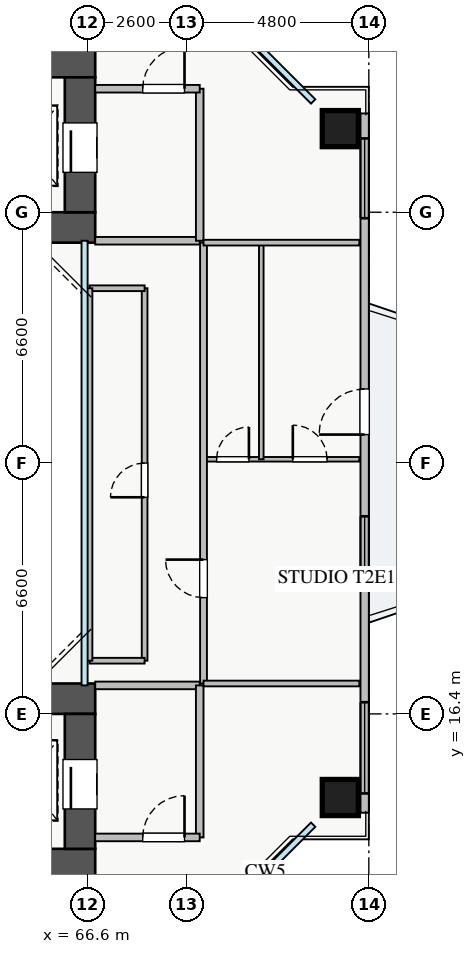
"""IFC4 building model, lengths in metres.
Left out: names, types, materials, properties, quantities, classifications, styles, units other than length and angle.
Written with IfcOpenShell. Run it as: python <this file> out.ifc"""

import sys

from ifc_helpers import new_model, si_unit, direction, frame, frame_2d, origin, origin_2d, place, context, subcontext, project, spatial, rectangle, extrude, source, transform, mapped, element, fill, save


model = new_model("IFC4")
c1 = context("Model", 3, precision=1e-05, world=origin(), true_north=direction((0.0, 1.0)))
c2 = subcontext(c1, "Body", "Model", "MODEL_VIEW")
j1 = project(units=[si_unit("LENGTHUNIT", "METRE"), si_unit("PLANEANGLEUNIT", "RADIAN")], contexts=[c1])
p1 = place(None, origin())
s1 = spatial("IfcSite", under=j1, at=p1, CompositionType="ELEMENT")
p2 = place(p1, origin())
s2 = spatial("IfcBuilding", under=s1, at=p2, CompositionType="ELEMENT")
p3 = place(p2, frame((0.0, 0.0, 32.75)))
s3 = spatial("IfcBuildingStorey", under=s2, at=p3, CompositionType="ELEMENT", Elevation=32.75)
p4 = place(p3, frame((54.2, 29.2, 0.0), z_axis=(0.0, 0.0, 1.0), x_axis=(1.0, 0.0, 0.0)))
e1 = element("IfcWall", 1, at=p4, inside=s3, PredefinedType="SHEAR", context=c2, shape_type="SweptSolid", body=[
    extrude(rectangle(XDim=12.6, YDim=0.8, at=frame_2d((6.3, 0.0))), origin(), (0.0, 0.0, 1.0), 3.25),
])
p5 = place(p3, frame((54.2, 33.55, 0.0), z_axis=(0.0, 0.0, 1.0), x_axis=(1.0, 0.0, 0.0)))
e2 = element("IfcWall", 2, at=p5, inside=s3, PredefinedType="SHEAR", context=c2, shape_type="SweptSolid", body=[
    extrude(rectangle(XDim=12.6, YDim=0.8, at=frame_2d((6.3, 0.0))), origin(), (0.0, 0.0, 1.0), 3.25),
])
p6 = place(p5, frame((8.2, 0.0, 0.0)))
e3 = element("IfcOpeningElement", 3, at=p6, cuts=e2, PredefinedType="OPENING", context=c2, shape_type="SweptSolid", body=[
    extrude(rectangle(XDim=1.1, YDim=2.05, at=frame_2d((0.55, 1.025))), frame((0.0, 0.41, 0.0), z_axis=(0.0, -1.0, 0.0), x_axis=(1.0, 0.0, 0.0)), (0.0, 0.0, 1.0), 0.82),
])
p7 = place(p3, frame((66.4, 29.6, 0.0), z_axis=(0.0, 0.0, 1.0), x_axis=(0.0, 1.0, 0.0)))
e4 = element("IfcWall", 4, at=p7, inside=s3, PredefinedType="SHEAR", context=c2, shape_type="SweptSolid", body=[
    extrude(rectangle(XDim=3.55, YDim=0.8, at=frame_2d((1.775, 0.0))), origin(), (0.0, 0.0, 1.0), 3.25),
])
p8 = place(p7, frame((1.05, 0.0, 0.0)))
e5 = element("IfcOpeningElement", 5, at=p8, cuts=e4, PredefinedType="OPENING", context=c2, shape_type="SweptSolid", body=[
    extrude(rectangle(XDim=1.3, YDim=2.05, at=frame_2d((0.65, 1.025))), frame((0.0, 0.41, 0.0), z_axis=(0.0, -1.0, 0.0), x_axis=(1.0, 0.0, 0.0)), (0.0, 0.0, 1.0), 0.82),
])
p9 = place(p3, frame((54.2, 12.45, 0.0), z_axis=(0.0, 0.0, 1.0), x_axis=(1.0, 0.0, 0.0)))
e6 = element("IfcWall", 6, at=p9, inside=s3, PredefinedType="SHEAR", context=c2, shape_type="SweptSolid", body=[
    extrude(rectangle(XDim=12.6, YDim=0.8, at=frame_2d((6.3, 0.0))), origin(), (0.0, 0.0, 1.0), 3.25),
])
p10 = place(p9, frame((8.2, 0.0, 0.0)))
e7 = element("IfcOpeningElement", 7, at=p10, cuts=e6, PredefinedType="OPENING", context=c2, shape_type="SweptSolid", body=[
    extrude(rectangle(XDim=1.1, YDim=2.05, at=frame_2d((0.55, 1.025))), frame((0.0, 0.41, 0.0), z_axis=(0.0, -1.0, 0.0), x_axis=(1.0, 0.0, 0.0)), (0.0, 0.0, 1.0), 0.82),
])
p11 = place(p3, frame((54.2, 16.8, 0.0), z_axis=(0.0, 0.0, 1.0), x_axis=(1.0, 0.0, 0.0)))
e8 = element("IfcWall", 8, at=p11, inside=s3, PredefinedType="SHEAR", context=c2, shape_type="SweptSolid", body=[
    extrude(rectangle(XDim=12.6, YDim=0.8, at=frame_2d((6.3, 0.0))), origin(), (0.0, 0.0, 1.0), 3.25),
])
p12 = place(p3, frame((66.4, 12.85, 0.0), z_axis=(0.0, 0.0, 1.0), x_axis=(0.0, 1.0, 0.0)))
e9 = element("IfcWall", 9, at=p12, inside=s3, PredefinedType="SHEAR", context=c2, shape_type="SweptSolid", body=[
    extrude(rectangle(XDim=3.55, YDim=0.8, at=frame_2d((1.775, 0.0))), origin(), (0.0, 0.0, 1.0), 3.25),
])
p13 = place(p12, frame((1.05, 0.0, 0.0)))
e10 = element("IfcOpeningElement", 10, at=p13, cuts=e9, PredefinedType="OPENING", context=c2, shape_type="SweptSolid", body=[
    extrude(rectangle(XDim=1.3, YDim=2.05, at=frame_2d((0.65, 1.025))), frame((0.0, 0.41, 0.0), z_axis=(0.0, -1.0, 0.0), x_axis=(1.0, 0.0, 0.0)), (0.0, 0.0, 1.0), 0.82),
])
m1 = source(origin(), c2, "Body", "SweptSolid", [
    extrude(rectangle(XDim=0.95, YDim=0.95, at=origin_2d()), origin(), (0.0, 0.0, 1.0), 3.25),
])
for number, where, z_axis, x_axis in (
    (11, (73.25, 14.2, 0.0), (0.0, 0.0, 1.0), (1.0, 0.0, 0.0)),
    (12, (73.25, 31.8, 0.0), (0.0, 0.0, 1.0), (1.0, 0.0, 0.0)),
):
    element("IfcColumn", number, at=place(p3, frame(where, z_axis=z_axis, x_axis=x_axis)), inside=s3, PredefinedType="COLUMN", context=c2, shape_type="MappedRepresentation", body=[
        mapped(m1, transform((0.0, 0.0, 0.0), x_axis=(1.0, 0.0, 0.0), y_axis=(0.0, 1.0, 0.0), z_axis=(0.0, 0.0, 1.0), scale=1.0)),
    ])
p14 = place(p3, frame((73.89, 13.8, 0.0), z_axis=(0.0, 0.0, 1.0), x_axis=(0.0, 1.0, 0.0)))
e13 = element("IfcWall", 13, at=p14, inside=s3, PredefinedType="STANDARD", context=c2, shape_type="SweptSolid", body=[
    extrude(rectangle(XDim=18.4, YDim=0.22, at=frame_2d((9.2, 0.0))), origin(), (0.0, 0.0, 1.0), 2.61),
])
p15 = place(p14, frame((9.95, 0.0, 0.0)))
e14 = element("IfcOpeningElement", 14, at=p15, cuts=e13, PredefinedType="OPENING", context=c2, shape_type="SweptSolid", body=[
    extrude(rectangle(XDim=1.2, YDim=2.1, at=frame_2d((0.6, 1.05))), frame((0.0, 0.12, 0.0), z_axis=(0.0, -1.0, 0.0), x_axis=(1.0, 0.0, 0.0)), (0.0, 0.0, 1.0), 0.24),
])
p16 = place(p14, frame((0.508, 0.0, 0.9)))
e15 = element("IfcOpeningElement", 15, at=p16, cuts=e13, PredefinedType="OPENING", context=c2, shape_type="SweptSolid", body=[
    extrude(rectangle(XDim=2.4, YDim=1.5, at=frame_2d((1.2, 0.75))), frame((0.0, 0.12, 0.0), z_axis=(0.0, -1.0, 0.0), x_axis=(1.0, 0.0, 0.0)), (0.0, 0.0, 1.0), 0.24),
])
p17 = place(p14, frame((6.0, 0.0, 0.9)))
e16 = element("IfcOpeningElement", 16, at=p17, cuts=e13, PredefinedType="OPENING", context=c2, shape_type="SweptSolid", body=[
    extrude(rectangle(XDim=1.8, YDim=1.45, at=frame_2d((0.9, 0.725))), frame((0.0, 0.12, 0.0), z_axis=(0.0, -1.0, 0.0), x_axis=(1.0, 0.0, 0.0)), (0.0, 0.0, 1.0), 0.24),
])
p18 = place(p14, frame((15.643, 0.0, 0.9)))
e17 = element("IfcOpeningElement", 17, at=p18, cuts=e13, PredefinedType="OPENING", context=c2, shape_type="SweptSolid", body=[
    extrude(rectangle(XDim=2.1, YDim=1.5, at=frame_2d((1.05, 0.75))), frame((0.0, 0.12, 0.0), z_axis=(0.0, -1.0, 0.0), x_axis=(1.0, 0.0, 0.0)), (0.0, 0.0, 1.0), 0.24),
])
p19 = place(p3, frame((66.8, 28.85, 0.0), z_axis=(0.0, 0.0, 1.0), x_axis=(1.0, 0.0, 0.0)))
e18 = element("IfcWall", 18, at=p19, inside=s3, PredefinedType="PARTITIONING", context=c2, shape_type="SweptSolid", body=[
    extrude(rectangle(XDim=2.75, YDim=0.2, at=frame_2d((1.375, 0.0))), origin(), (0.0, 0.0, 1.0), 3.07),
])
p20 = place(p3, frame((69.55, 28.85, 0.0), z_axis=(0.0, 0.0, 1.0), x_axis=(0.0, 1.0, 0.0)))
e19 = element("IfcWall", 19, at=p20, inside=s3, PredefinedType="PARTITIONING", context=c2, shape_type="SweptSolid", body=[
    extrude(rectangle(XDim=4.0, YDim=0.2, at=frame_2d((2.0, 0.0))), origin(), (0.0, 0.0, 1.0), 2.615),
])
p21 = place(p3, frame((66.8, 32.85, 0.0), z_axis=(0.0, 0.0, 1.0), x_axis=(1.0, 0.0, 0.0)))
e20 = element("IfcWall", 20, at=p21, inside=s3, PredefinedType="PARTITIONING", context=c2, shape_type="SweptSolid", body=[
    extrude(rectangle(XDim=2.75, YDim=0.2, at=frame_2d((1.375, 0.0))), origin(), (0.0, 0.0, 1.0), 3.07),
])
p22 = place(p21, frame((1.25, 0.0, 0.0)))
e21 = element("IfcOpeningElement", 21, at=p22, cuts=e20, PredefinedType="OPENING", context=c2, shape_type="SweptSolid", body=[
    extrude(rectangle(XDim=1.1, YDim=2.05, at=frame_2d((0.55, 1.025))), frame((0.0, 0.11, 0.0), z_axis=(0.0, -1.0, 0.0), x_axis=(1.0, 0.0, 0.0)), (0.0, 0.0, 1.0), 0.22),
])
p23 = place(p3, frame((66.8, 17.15, 0.0), z_axis=(0.0, 0.0, 1.0), x_axis=(1.0, 0.0, 0.0)))
e22 = element("IfcWall", 22, at=p23, inside=s3, PredefinedType="PARTITIONING", context=c2, shape_type="SweptSolid", body=[
    extrude(rectangle(XDim=2.75, YDim=0.2, at=frame_2d((1.375, 0.0))), origin(), (0.0, 0.0, 1.0), 3.07),
])
p24 = place(p3, frame((69.55, 13.15, 0.0), z_axis=(0.0, 0.0, 1.0), x_axis=(0.0, 1.0, 0.0)))
e23 = element("IfcWall", 23, at=p24, inside=s3, PredefinedType="PARTITIONING", context=c2, shape_type="SweptSolid", body=[
    extrude(rectangle(XDim=4.0, YDim=0.2, at=frame_2d((2.0, 0.0))), origin(), (0.0, 0.0, 1.0), 2.615),
])
p25 = place(p3, frame((66.8, 13.15, 0.0), z_axis=(0.0, 0.0, 1.0), x_axis=(1.0, 0.0, 0.0)))
e24 = element("IfcWall", 24, at=p25, inside=s3, PredefinedType="PARTITIONING", context=c2, shape_type="SweptSolid", body=[
    extrude(rectangle(XDim=2.75, YDim=0.2, at=frame_2d((1.375, 0.0))), origin(), (0.0, 0.0, 1.0), 3.07),
])
p26 = place(p25, frame((1.25, 0.0, 0.0)))
e25 = element("IfcOpeningElement", 25, at=p26, cuts=e24, PredefinedType="OPENING", context=c2, shape_type="SweptSolid", body=[
    extrude(rectangle(XDim=1.1, YDim=2.05, at=frame_2d((0.55, 1.025))), frame((0.0, 0.11, 0.0), z_axis=(0.0, -1.0, 0.0), x_axis=(1.0, 0.0, 0.0)), (0.0, 0.0, 1.0), 0.22),
])
p27 = place(p3, frame((69.65, 23.1, 0.0), z_axis=(0.0, 0.0, 1.0), x_axis=(1.0, 0.0, 0.0)))
e26 = element("IfcWall", 26, at=p27, inside=s3, PredefinedType="PLUMBINGWALL", context=c2, shape_type="SweptSolid", body=[
    extrude(rectangle(XDim=4.1, YDim=0.12, at=frame_2d((2.05, 0.0))), origin(), (0.0, 0.0, 1.0), 2.865),
])
p28 = place(p27, frame((0.345, 0.0, 0.0)))
e27 = element("IfcOpeningElement", 27, at=p28, cuts=e26, PredefinedType="OPENING", context=c2, shape_type="SweptSolid", body=[
    extrude(rectangle(XDim=0.85, YDim=2.05, at=frame_2d((0.425, 1.025))), frame((0.0, 0.07, 0.0), z_axis=(0.0, -1.0, 0.0), x_axis=(1.0, 0.0, 0.0)), (0.0, 0.0, 1.0), 0.14),
])
p29 = place(p27, frame((2.35, 0.0, 0.0)))
e28 = element("IfcOpeningElement", 28, at=p29, cuts=e26, PredefinedType="OPENING", context=c2, shape_type="SweptSolid", body=[
    extrude(rectangle(XDim=0.9, YDim=2.05, at=frame_2d((0.45, 1.025))), frame((0.0, 0.07, 0.0), z_axis=(0.0, -1.0, 0.0), x_axis=(1.0, 0.0, 0.0)), (0.0, 0.0, 1.0), 0.14),
])
p30 = place(p3, frame((71.17, 23.1, 0.0), z_axis=(0.0, 0.0, 1.0), x_axis=(0.0, 1.0, 0.0)))
e29 = element("IfcWall", 29, at=p30, inside=s3, PredefinedType="PLUMBINGWALL", context=c2, shape_type="SweptSolid", body=[
    extrude(rectangle(XDim=5.7, YDim=0.12, at=frame_2d((2.85, 0.0))), origin(), (0.0, 0.0, 1.0), 3.07),
])
p31 = place(p3, frame((69.65, 17.2, 0.0), z_axis=(0.0, 0.0, 1.0), x_axis=(0.0, 1.0, 0.0)))
e30 = element("IfcWall", 30, at=p31, inside=s3, PredefinedType="PARTITIONING", context=c2, shape_type="SweptSolid", body=[
    extrude(rectangle(XDim=11.6, YDim=0.18, at=frame_2d((5.8, 0.0))), origin(), (0.0, 0.0, 1.0), 3.07),
])
p32 = place(p31, frame((2.26, 0.0, 0.0)))
e31 = element("IfcOpeningElement", 31, at=p32, cuts=e30, PredefinedType="OPENING", context=c2, shape_type="SweptSolid", body=[
    extrude(rectangle(XDim=1.0, YDim=2.05, at=frame_2d((0.5, 1.025))), frame((0.0, 0.1, 0.0), z_axis=(0.0, -1.0, 0.0), x_axis=(1.0, 0.0, 0.0)), (0.0, 0.0, 1.0), 0.2),
])
for number, where, z_axis, x_axis in (
    (32, (69.65, 17.2, 0.0), (0.0, 0.0, 1.0), (1.0, 0.0, 0.0)),
    (33, (69.65, 28.8, 0.0), (0.0, 0.0, 1.0), (1.0, 0.0, 0.0)),
):
    element("IfcWall", number, at=place(p3, frame(where, z_axis=z_axis, x_axis=x_axis)), inside=s3, PredefinedType="PARTITIONING", context=c2, shape_type="SweptSolid", body=[
        extrude(rectangle(XDim=4.1, YDim=0.15, at=frame_2d((2.05, 0.0))), origin(), (0.0, 0.0, 1.0), 3.07),
    ])
p33 = place(p3, frame((68.1, 17.8, 0.0), z_axis=(0.0, 0.0, 1.0), x_axis=(0.0, 1.0, 0.0)))
e34 = element("IfcWall", 34, at=p33, inside=s3, PredefinedType="PARTITIONING", context=c2, shape_type="SweptSolid", body=[
    extrude(rectangle(XDim=9.8, YDim=0.15, at=frame_2d((4.9, 0.0))), origin(), (0.0, 0.0, 1.0), 3.07),
])
p34 = place(p33, frame((4.3, 0.0, 0.0)))
e35 = element("IfcOpeningElement", 35, at=p34, cuts=e34, PredefinedType="OPENING", context=c2, shape_type="SweptSolid", body=[
    extrude(rectangle(XDim=0.9, YDim=2.05, at=frame_2d((0.45, 1.025))), frame((0.0, 0.085, 0.0), z_axis=(0.0, -1.0, 0.0), x_axis=(1.0, 0.0, 0.0)), (0.0, 0.0, 1.0), 0.17),
])
p35 = place(p3, frame((66.65, 27.6, 0.0), z_axis=(0.0, 0.0, 1.0), x_axis=(1.0, 0.0, 0.0)))
e36 = element("IfcWall", 36, at=p35, inside=s3, PredefinedType="PARTITIONING", context=c2, shape_type="SweptSolid", body=[
    extrude(rectangle(XDim=1.45, YDim=0.15, at=frame_2d((0.725, 0.0))), origin(), (0.0, 0.0, 1.0), 2.865),
])
p36 = place(p3, frame((66.65, 17.8, 0.0), z_axis=(0.0, 0.0, 1.0), x_axis=(1.0, 0.0, 0.0)))
e37 = element("IfcWall", 37, at=p36, inside=s3, PredefinedType="PARTITIONING", context=c2, shape_type="SweptSolid", body=[
    extrude(rectangle(XDim=1.45, YDim=0.15, at=frame_2d((0.725, 0.0))), origin(), (0.0, 0.0, 1.0), 3.07),
])
p37 = place(p3, frame((66.65, 17.8, 0.0), z_axis=(0.0, 0.0, 1.0), x_axis=(0.0, 1.0, 0.0)))
e38 = element("IfcWall", 38, at=p37, inside=s3, PredefinedType="PARTITIONING", context=c2, shape_type="SweptSolid", body=[
    extrude(rectangle(XDim=9.8, YDim=0.15, at=frame_2d((4.9, 0.0))), origin(), (0.0, 0.0, 1.0), 2.665),
])
m2 = source(origin(), c2, "Body", "SweptSolid", [
    extrude(rectangle(XDim=1.2, YDim=2.1, at=frame_2d((0.6, 1.05))), frame((0.0, 0.025, 0.0), z_axis=(0.0, -1.0, 0.0), x_axis=(1.0, 0.0, 0.0)), (0.0, 0.0, 1.0), 0.05),
])
p38 = place(p15, origin())
e39 = element("IfcDoor", 39, at=p38, inside=s3, OperationType="SINGLE_SWING_LEFT", PredefinedType="DOOR", context=c2, shape_type="MappedRepresentation", body=[
    mapped(m2, transform((0.0, 0.0, 0.0), x_axis=(1.0, 0.0, 0.0), y_axis=(0.0, 1.0, 0.0), z_axis=(0.0, 0.0, 1.0), scale=1.0)),
])
fill(e14, e39)
m3 = source(origin(), c2, "Body", "SweptSolid", [
    extrude(rectangle(XDim=2.4, YDim=1.5, at=frame_2d((1.2, 0.75))), frame((0.0, 0.03, 0.0), z_axis=(0.0, -1.0, 0.0), x_axis=(1.0, 0.0, 0.0)), (0.0, 0.0, 1.0), 0.06),
])
p39 = place(p16, origin())
e40 = element("IfcWindow", 40, at=p39, inside=s3, PartitioningType="TRIPLE_PANEL_VERTICAL", PredefinedType="WINDOW", context=c2, shape_type="MappedRepresentation", body=[
    mapped(m3, transform((0.0, 0.0, 0.0), x_axis=(1.0, 0.0, 0.0), y_axis=(0.0, 1.0, 0.0), z_axis=(0.0, 0.0, 1.0), scale=1.0)),
])
fill(e15, e40)
m4 = source(origin(), c2, "Body", "SweptSolid", [
    extrude(rectangle(XDim=1.8, YDim=1.45, at=frame_2d((0.9, 0.725))), frame((0.0, 0.03, 0.0), z_axis=(0.0, -1.0, 0.0), x_axis=(1.0, 0.0, 0.0)), (0.0, 0.0, 1.0), 0.06),
])
p40 = place(p17, origin())
e41 = element("IfcWindow", 41, at=p40, inside=s3, PartitioningType="DOUBLE_PANEL_VERTICAL", PredefinedType="WINDOW", context=c2, shape_type="MappedRepresentation", body=[
    mapped(m4, transform((0.0, 0.0, 0.0), x_axis=(1.0, 0.0, 0.0), y_axis=(0.0, 1.0, 0.0), z_axis=(0.0, 0.0, 1.0), scale=1.0)),
])
fill(e16, e41)
m5 = source(origin(), c2, "Body", "SweptSolid", [
    extrude(rectangle(XDim=2.1, YDim=1.5, at=frame_2d((1.05, 0.75))), frame((0.0, 0.03, 0.0), z_axis=(0.0, -1.0, 0.0), x_axis=(1.0, 0.0, 0.0)), (0.0, 0.0, 1.0), 0.06),
])
p41 = place(p18, origin())
e42 = element("IfcWindow", 42, at=p41, inside=s3, PartitioningType="TRIPLE_PANEL_VERTICAL", PredefinedType="WINDOW", context=c2, shape_type="MappedRepresentation", body=[
    mapped(m5, transform((0.0, 0.0, 0.0), x_axis=(1.0, 0.0, 0.0), y_axis=(0.0, 1.0, 0.0), z_axis=(0.0, 0.0, 1.0), scale=1.0)),
])
fill(e17, e42)
m6 = source(origin(), c2, "Body", "SweptSolid", [
    extrude(rectangle(XDim=1.3, YDim=2.05, at=frame_2d((0.65, 1.025))), frame((0.0, 0.025, 0.0), z_axis=(0.0, -1.0, 0.0), x_axis=(1.0, 0.0, 0.0)), (0.0, 0.0, 1.0), 0.05),
])
p42 = place(p8, origin())
e43 = element("IfcDoor", 43, at=p42, inside=s3, OperationType="SLIDING_TO_LEFT", PredefinedType="DOOR", context=c2, shape_type="MappedRepresentation", body=[
    mapped(m6, transform((0.0, 0.0, 0.0), x_axis=(1.0, 0.0, 0.0), y_axis=(0.0, 1.0, 0.0), z_axis=(0.0, 0.0, 1.0), scale=1.0)),
])
fill(e5, e43)
p43 = place(p13, origin())
e44 = element("IfcDoor", 44, at=p43, inside=s3, OperationType="SLIDING_TO_RIGHT", PredefinedType="DOOR", context=c2, shape_type="MappedRepresentation", body=[
    mapped(m6, transform((0.0, 0.0, 0.0), x_axis=(1.0, 0.0, 0.0), y_axis=(0.0, 1.0, 0.0), z_axis=(0.0, 0.0, 1.0), scale=1.0)),
])
fill(e10, e44)
m7 = source(origin(), c2, "Body", "SweptSolid", [
    extrude(rectangle(XDim=1.1, YDim=2.05, at=frame_2d((0.55, 1.025))), frame((0.0, 0.025, 0.0), z_axis=(0.0, -1.0, 0.0), x_axis=(1.0, 0.0, 0.0)), (0.0, 0.0, 1.0), 0.05),
])
p44 = place(p22, origin())
e45 = element("IfcDoor", 45, at=p44, inside=s3, OperationType="SINGLE_SWING_RIGHT", PredefinedType="DOOR", context=c2, shape_type="MappedRepresentation", body=[
    mapped(m7, transform((0.0, 0.0, 0.0), x_axis=(1.0, 0.0, 0.0), y_axis=(0.0, 1.0, 0.0), z_axis=(0.0, 0.0, 1.0), scale=1.0)),
])
fill(e21, e45)
p45 = place(p26, origin())
e46 = element("IfcDoor", 46, at=p45, inside=s3, OperationType="SINGLE_SWING_RIGHT", PredefinedType="DOOR", context=c2, shape_type="MappedRepresentation", body=[
    mapped(m7, transform((0.0, 0.0, 0.0), x_axis=(1.0, 0.0, 0.0), y_axis=(0.0, 1.0, 0.0), z_axis=(0.0, 0.0, 1.0), scale=1.0)),
])
fill(e25, e46)
m8 = source(origin(), c2, "Body", "SweptSolid", [
    extrude(rectangle(XDim=0.85, YDim=2.05, at=frame_2d((0.425, 1.025))), frame((0.0, 0.025, 0.0), z_axis=(0.0, -1.0, 0.0), x_axis=(1.0, 0.0, 0.0)), (0.0, 0.0, 1.0), 0.05),
])
p46 = place(p28, origin())
e47 = element("IfcDoor", 47, at=p46, inside=s3, OperationType="SINGLE_SWING_RIGHT", PredefinedType="DOOR", context=c2, shape_type="MappedRepresentation", body=[
    mapped(m8, transform((0.0, 0.0, 0.0), x_axis=(1.0, 0.0, 0.0), y_axis=(0.0, 1.0, 0.0), z_axis=(0.0, 0.0, 1.0), scale=1.0)),
])
fill(e27, e47)
m9 = source(origin(), c2, "Body", "SweptSolid", [
    extrude(rectangle(XDim=0.9, YDim=2.05, at=frame_2d((0.45, 1.025))), frame((0.0, 0.025, 0.0), z_axis=(0.0, -1.0, 0.0), x_axis=(1.0, 0.0, 0.0)), (0.0, 0.0, 1.0), 0.05),
])
p47 = place(p29, origin())
e48 = element("IfcDoor", 48, at=p47, inside=s3, OperationType="SINGLE_SWING_LEFT", PredefinedType="DOOR", context=c2, shape_type="MappedRepresentation", body=[
    mapped(m9, transform((0.0, 0.0, 0.0), x_axis=(1.0, 0.0, 0.0), y_axis=(0.0, 1.0, 0.0), z_axis=(0.0, 0.0, 1.0), scale=1.0)),
])
fill(e28, e48)
m10 = source(origin(), c2, "Body", "SweptSolid", [
    extrude(rectangle(XDim=1.0, YDim=2.05, at=frame_2d((0.5, 1.025))), frame((0.0, 0.025, 0.0), z_axis=(0.0, -1.0, 0.0), x_axis=(1.0, 0.0, 0.0)), (0.0, 0.0, 1.0), 0.05),
])
p48 = place(p32, origin())
e49 = element("IfcDoor", 49, at=p48, inside=s3, OperationType="SINGLE_SWING_RIGHT", PredefinedType="DOOR", context=c2, shape_type="MappedRepresentation", body=[
    mapped(m10, transform((0.0, 0.0, 0.0), x_axis=(1.0, 0.0, 0.0), y_axis=(0.0, 1.0, 0.0), z_axis=(0.0, 0.0, 1.0), scale=1.0)),
])
fill(e31, e49)
p49 = place(p34, origin())
e50 = element("IfcDoor", 50, at=p49, inside=s3, OperationType="SINGLE_SWING_LEFT", PredefinedType="DOOR", context=c2, shape_type="MappedRepresentation", body=[
    mapped(m9, transform((0.0, 0.0, 0.0), x_axis=(1.0, 0.0, 0.0), y_axis=(0.0, 1.0, 0.0), z_axis=(0.0, 0.0, 1.0), scale=1.0)),
])
fill(e35, e50)
save(model, sys.argv[1])
